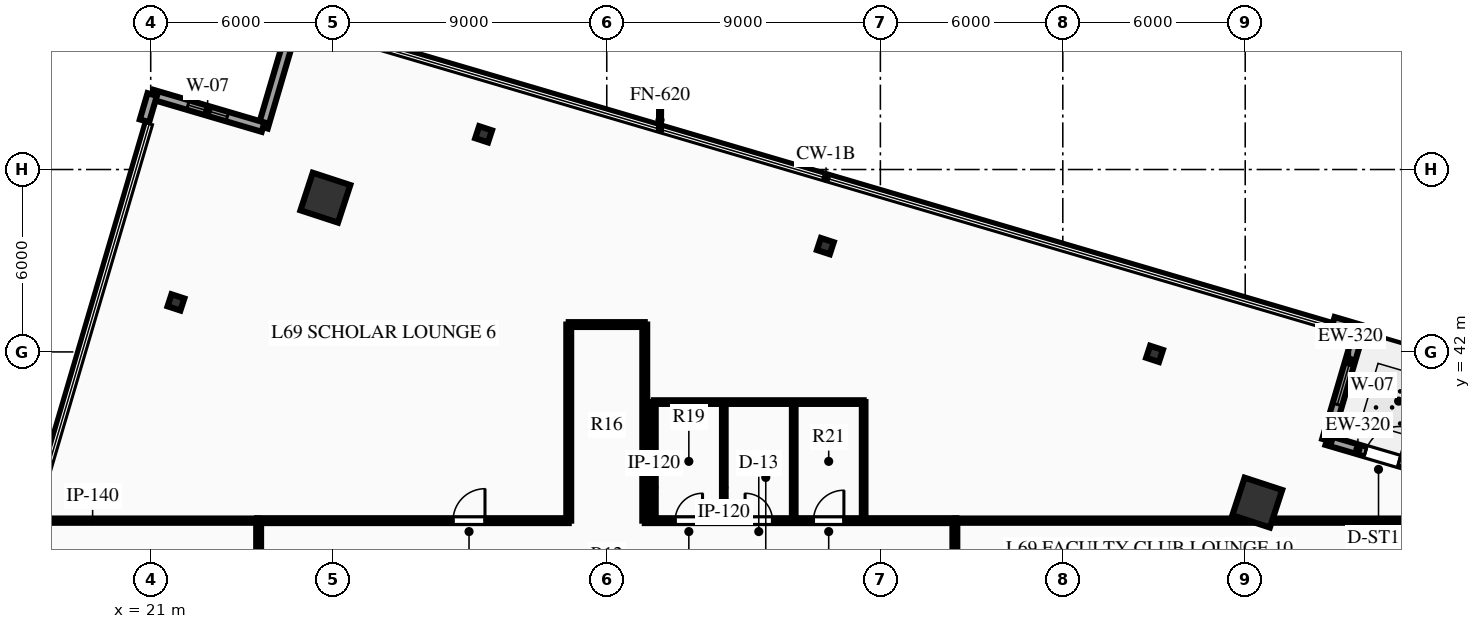
"""IFC4 building model, lengths in metres.
Left out: names, types, materials, properties, quantities, classifications, styles, units other than length and angle.
Written with IfcOpenShell. Run it as: python <this file> out.ifc"""

import sys

from ifc_helpers import new_model, si_unit, direction, frame, frame_2d, origin, origin_2d, place, context, subcontext, project, spatial, rectangle, hollow_rectangle, i_section, extrude, element, fill, save


model = new_model("IFC4")
c1 = context("Model", 3, precision=1e-05, world=origin(), true_north=direction((0.0, 1.0)))
c2 = subcontext(c1, "Body", "Model", "MODEL_VIEW")
j1 = project(units=[si_unit("LENGTHUNIT", "METRE"), si_unit("PLANEANGLEUNIT", "RADIAN")], contexts=[c1])
p1 = place(None, origin())
s1 = spatial("IfcSite", under=j1, at=p1, CompositionType="ELEMENT")
p2 = place(p1, origin())
s2 = spatial("IfcBuilding", under=s1, at=p2, CompositionType="ELEMENT")
p3 = place(p2, frame((0.0, 0.0, 274.95)))
s3 = spatial("IfcBuildingStorey", under=s2, at=p3, CompositionType="ELEMENT", Elevation=274.95)
for number, where, z_axis, x_axis in (
    (1, (57.396, 37.043, 0.0), (0.0, 0.0, 1.0), (0.311, 0.95, 0.0)),
    (2, (26.745, 47.073, 0.0), (0.0, 0.0, 1.0), (0.311, 0.95, 0.0)),
):
    element("IfcColumn", number, at=place(p3, frame(where, z_axis=z_axis, x_axis=x_axis)), inside=s3, PredefinedType="COLUMN", context=c2, shape_type="SweptSolid", body=[
        extrude(hollow_rectangle(XDim=1.3, YDim=1.3, WallThickness=0.06, at=origin_2d()), origin(), (0.0, 0.0, 1.0), 3.75),
    ])
for number, where, z_axis, x_axis in (
    (3, (54.018, 41.937, 0.0), (0.0, 0.0, 1.0), (0.311, 0.95, 0.0)),
    (4, (43.19, 45.48, 0.0), (0.0, 0.0, 1.0), (0.311, 0.95, 0.0)),
    (5, (31.949, 49.158, 0.0), (0.0, 0.0, 1.0), (0.311, 0.95, 0.0)),
    (6, (21.83, 43.629, 0.0), (0.0, 0.0, 1.0), (0.311, 0.95, 0.0)),
):
    element("IfcColumn", number, at=place(p3, frame(where, z_axis=z_axis, x_axis=x_axis)), inside=s3, PredefinedType="COLUMN", context=c2, shape_type="SweptSolid", body=[
        extrude(i_section(OverallWidth=0.416, OverallDepth=0.445, WebThickness=0.039, FlangeThickness=0.063, at=origin_2d()), origin(), (0.0, 0.0, 1.0), 3.75),
    ])
p4 = place(p3, frame((59.686, 39.095, 0.0), z_axis=(0.0, 0.0, 1.0), x_axis=(0.959321496859, -0.282315896939, 0.0)))
e7 = element("IfcWall", 7, at=p4, inside=s3, PredefinedType="STANDARD", context=c2, shape_type="SweptSolid", body=[
    extrude(rectangle(XDim=3.8, YDim=0.32, at=frame_2d((1.9, 0.0))), origin(), (0.0, 0.0, 1.0), 3.48),
])
p5 = place(p4, frame((1.325, 0.0, 0.0)))
e8 = element("IfcOpeningElement", 8, at=p5, cuts=e7, PredefinedType="OPENING", context=c2, shape_type="SweptSolid", body=[
    extrude(rectangle(XDim=1.15, YDim=2.2, at=frame_2d((0.575, 1.1))), frame((0.0, 0.17, 0.0), z_axis=(0.0, -1.0, 0.0), x_axis=(1.0, 0.0, 0.0)), (0.0, 0.0, 1.0), 0.34),
])
p6 = place(p3, frame((60.759, 42.74, 0.0), z_axis=(0.0, 0.0, 1.0), x_axis=(-0.282315896939, -0.959321496859, 0.0)))
e9 = element("IfcWall", 9, at=p6, inside=s3, PredefinedType="STANDARD", context=c2, shape_type="SweptSolid", body=[
    extrude(rectangle(XDim=3.8, YDim=0.32, at=frame_2d((1.9, 0.0))), origin(), (0.0, 0.0, 1.0), 3.48),
])
p7 = place(p6, frame((1.225, 0.0, 0.85)))
e10 = element("IfcOpeningElement", 10, at=p7, cuts=e9, PredefinedType="OPENING", context=c2, shape_type="SweptSolid", body=[
    extrude(rectangle(XDim=1.35, YDim=1.95, at=frame_2d((0.675, 0.975))), frame((0.0, 0.17, 0.0), z_axis=(0.0, -1.0, 0.0), x_axis=(1.0, 0.0, 0.0)), (0.0, 0.0, 1.0), 0.34),
])
p8 = place(p3, frame((59.896, 42.995, 0.0), z_axis=(0.0, 0.0, 1.0), x_axis=(0.959292029891, -0.282416007669, 0.0)))
e11 = element("IfcWall", 11, at=p8, inside=s3, PredefinedType="STANDARD", context=c2, shape_type="SweptSolid", body=[
    extrude(rectangle(XDim=0.9, YDim=0.32, at=frame_2d((0.45, 0.0))), origin(), (0.0, 0.0, 1.0), 3.48),
])
p9 = place(p3, frame((24.695, 49.394, 0.0), z_axis=(0.0, 0.0, 1.0), x_axis=(0.282315896939, 0.959321496859, 0.0)))
e12 = element("IfcWall", 12, at=p9, inside=s3, PredefinedType="STANDARD", context=c2, shape_type="SweptSolid", body=[
    extrude(rectangle(XDim=3.8, YDim=0.32, at=frame_2d((1.9, 0.0))), origin(), (0.0, 0.0, 1.0), 3.48),
])
p10 = place(p3, frame((21.05, 50.467, 0.0), z_axis=(0.0, 0.0, 1.0), x_axis=(0.959321496859, -0.282315896939, 0.0)))
e13 = element("IfcWall", 13, at=p10, inside=s3, PredefinedType="STANDARD", context=c2, shape_type="SweptSolid", body=[
    extrude(rectangle(XDim=3.8, YDim=0.32, at=frame_2d((1.9, 0.0))), origin(), (0.0, 0.0, 1.0), 3.48),
])
p11 = place(p10, frame((1.225, 0.0, 0.85)))
e14 = element("IfcOpeningElement", 14, at=p11, cuts=e13, PredefinedType="OPENING", context=c2, shape_type="SweptSolid", body=[
    extrude(rectangle(XDim=1.35, YDim=1.95, at=frame_2d((0.675, 0.975))), frame((0.0, 0.17, 0.0), z_axis=(0.0, -1.0, 0.0), x_axis=(1.0, 0.0, 0.0)), (0.0, 0.0, 1.0), 0.34),
])
p12 = place(p3, frame((20.796, 49.603, 0.0), z_axis=(0.0, 0.0, 1.0), x_axis=(0.282342527421, 0.959313659451, 0.0)))
e15 = element("IfcWall", 15, at=p12, inside=s3, PredefinedType="STANDARD", context=c2, shape_type="SweptSolid", body=[
    extrude(rectangle(XDim=0.9, YDim=0.32, at=frame_2d((0.45, 0.0))), origin(), (0.0, 0.0, 1.0), 3.48),
])
p13 = place(p3, frame((24.5, 36.45, 0.0), z_axis=(0.0, 0.0, 1.0), x_axis=(1.0, 0.0, 0.0)))
e16 = element("IfcWall", 16, at=p13, inside=s3, PredefinedType="PARTITIONING", context=c2, shape_type="SweptSolid", body=[
    extrude(rectangle(XDim=10.25, YDim=0.16, at=frame_2d((5.125, 0.0))), origin(), (0.0, 0.0, 1.0), 3.48),
])
p14 = place(p13, frame((6.445, 0.0, 0.0)))
e17 = element("IfcOpeningElement", 17, at=p14, cuts=e16, PredefinedType="OPENING", context=c2, shape_type="SweptSolid", body=[
    extrude(rectangle(XDim=1.05, YDim=2.15, at=frame_2d((0.525, 1.075))), frame((0.0, 0.09, 0.0), z_axis=(0.0, -1.0, 0.0), x_axis=(1.0, 0.0, 0.0)), (0.0, 0.0, 1.0), 0.18),
])
p15 = place(p3, frame((37.25, 36.45, 0.0), z_axis=(0.0, 0.0, 1.0), x_axis=(1.0, 0.0, 0.0)))
e18 = element("IfcWall", 18, at=p15, inside=s3, PredefinedType="PARTITIONING", context=c2, shape_type="SweptSolid", body=[
    extrude(rectangle(XDim=10.25, YDim=0.16, at=frame_2d((5.125, 0.0))), origin(), (0.0, 0.0, 1.0), 3.48),
])
p16 = place(p15, frame((1.0, 0.0, 0.0)))
e19 = element("IfcOpeningElement", 19, at=p16, cuts=e18, PredefinedType="OPENING", context=c2, shape_type="SweptSolid", body=[
    extrude(rectangle(XDim=0.9, YDim=2.15, at=frame_2d((0.45, 1.075))), frame((0.0, 0.09, 0.0), z_axis=(0.0, -1.0, 0.0), x_axis=(1.0, 0.0, 0.0)), (0.0, 0.0, 1.0), 0.18),
])
p17 = place(p15, frame((3.3, 0.0, 0.0)))
e20 = element("IfcOpeningElement", 20, at=p17, cuts=e18, PredefinedType="OPENING", context=c2, shape_type="SweptSolid", body=[
    extrude(rectangle(XDim=0.9, YDim=2.15, at=frame_2d((0.45, 1.075))), frame((0.0, 0.09, 0.0), z_axis=(0.0, -1.0, 0.0), x_axis=(1.0, 0.0, 0.0)), (0.0, 0.0, 1.0), 0.18),
])
p18 = place(p15, frame((5.55, 0.0, 0.0)))
e21 = element("IfcOpeningElement", 21, at=p18, cuts=e18, PredefinedType="OPENING", context=c2, shape_type="SweptSolid", body=[
    extrude(rectangle(XDim=1.0, YDim=2.15, at=frame_2d((0.5, 1.075))), frame((0.0, 0.09, 0.0), z_axis=(0.0, -1.0, 0.0), x_axis=(1.0, 0.0, 0.0)), (0.0, 0.0, 1.0), 0.18),
])
p19 = place(p3, frame((24.55, 27.25, 0.0), z_axis=(0.0, 0.0, 1.0), x_axis=(0.0, 1.0, 0.0)))
e22 = element("IfcWall", 22, at=p19, inside=s3, PredefinedType="PARTITIONING", context=c2, shape_type="SweptSolid", body=[
    extrude(rectangle(XDim=9.2, YDim=0.16, at=frame_2d((4.6, 0.0))), origin(), (0.0, 0.0, 1.0), 3.48),
])
p20 = place(p19, frame((2.419, 0.0, 0.0)))
e23 = element("IfcOpeningElement", 23, at=p20, cuts=e22, PredefinedType="OPENING", context=c2, shape_type="SweptSolid", body=[
    extrude(rectangle(XDim=1.05, YDim=2.15, at=frame_2d((0.525, 1.075))), frame((0.0, 0.09, 0.0), z_axis=(0.0, -1.0, 0.0), x_axis=(1.0, 0.0, 0.0)), (0.0, 0.0, 1.0), 0.18),
])
p21 = place(p3, frame((47.45, 27.25, 0.0), z_axis=(0.0, 0.0, 1.0), x_axis=(0.0, 1.0, 0.0)))
e24 = element("IfcWall", 24, at=p21, inside=s3, PredefinedType="PARTITIONING", context=c2, shape_type="SweptSolid", body=[
    extrude(rectangle(XDim=9.2, YDim=0.16, at=frame_2d((4.6, 0.0))), origin(), (0.0, 0.0, 1.0), 3.48),
])
p22 = place(p21, frame((5.083, 0.0, 0.0)))
e25 = element("IfcOpeningElement", 25, at=p22, cuts=e24, PredefinedType="OPENING", context=c2, shape_type="SweptSolid", body=[
    extrude(rectangle(XDim=1.05, YDim=2.15, at=frame_2d((0.525, 1.075))), frame((0.0, 0.09, 0.0), z_axis=(0.0, -1.0, 0.0), x_axis=(1.0, 0.0, 0.0)), (0.0, 0.0, 1.0), 0.18),
])
for number, where, z_axis, x_axis in (
    (26, (34.75, 36.45, 0.0), (0.0, 0.0, 1.0), (0.0, 1.0, 0.0)),
    (27, (37.25, 36.45, 0.0), (0.0, 0.0, 1.0), (0.0, 1.0, 0.0)),
):
    element("IfcWall", number, at=place(p3, frame(where, z_axis=z_axis, x_axis=x_axis)), inside=s3, PredefinedType="PARTITIONING", context=c2, shape_type="SweptSolid", body=[
        extrude(rectangle(XDim=6.45, YDim=0.16, at=frame_2d((3.225, 0.0))), origin(), (0.0, 0.0, 1.0), 3.48),
    ])
p23 = place(p3, frame((34.75, 42.9, 0.0), z_axis=(0.0, 0.0, 1.0), x_axis=(1.0, 0.0, 0.0)))
e28 = element("IfcWall", 28, at=p23, inside=s3, PredefinedType="PARTITIONING", context=c2, shape_type="SweptSolid", body=[
    extrude(rectangle(XDim=2.5, YDim=0.16, at=frame_2d((1.25, 0.0))), origin(), (0.0, 0.0, 1.0), 3.48),
])
for number, where, z_axis, x_axis in (
    (29, (37.55, 36.45, 0.0), (0.0, 0.0, 1.0), (0.0, 1.0, 0.0)),
    (30, (39.85, 36.45, 0.0), (0.0, 0.0, 1.0), (0.0, 1.0, 0.0)),
    (31, (42.15, 36.45, 0.0), (0.0, 0.0, 1.0), (0.0, 1.0, 0.0)),
    (32, (44.45, 36.45, 0.0), (0.0, 0.0, 1.0), (0.0, 1.0, 0.0)),
):
    element("IfcWall", number, at=place(p3, frame(where, z_axis=z_axis, x_axis=x_axis)), inside=s3, PredefinedType="PARTITIONING", context=c2, shape_type="SweptSolid", body=[
        extrude(rectangle(XDim=3.9, YDim=0.12, at=frame_2d((1.95, 0.0))), origin(), (0.0, 0.0, 1.0), 3.48),
    ])
p24 = place(p3, frame((37.55, 40.35, 0.0), z_axis=(0.0, 0.0, 1.0), x_axis=(1.0, 0.0, 0.0)))
e33 = element("IfcWall", 33, at=p24, inside=s3, PredefinedType="PARTITIONING", context=c2, shape_type="SweptSolid", body=[
    extrude(rectangle(XDim=6.9, YDim=0.12, at=frame_2d((3.45, 0.0))), origin(), (0.0, 0.0, 1.0), 3.48),
])
p25 = place(p3, frame((16.966, 36.45, 0.0), z_axis=(0.0, 0.0, 1.0), x_axis=(1.0, 0.0, 0.0)))
e34 = element("IfcWall", 34, at=p25, inside=s3, PredefinedType="PARTITIONING", context=c2, shape_type="SweptSolid", body=[
    extrude(rectangle(XDim=7.584, YDim=0.14, at=frame_2d((3.792, 0.0))), origin(), (0.0, 0.0, 1.0), 3.48),
])
p26 = place(p3, frame((47.45, 36.45, 0.0), z_axis=(0.0, 0.0, 1.0), x_axis=(1.0, 0.0, 0.0)))
e35 = element("IfcWall", 35, at=p26, inside=s3, PredefinedType="PARTITIONING", context=c2, shape_type="SweptSolid", body=[
    extrude(rectangle(XDim=15.377, YDim=0.14, at=frame_2d((7.688, 0.0))), origin(), (0.0, 0.0, 1.0), 2.858),
])
p27 = place(p5, origin())
e36 = element("IfcDoor", 36, at=p27, inside=s3, OperationType="SINGLE_SWING_RIGHT", PredefinedType="DOOR", context=c2, shape_type="SweptSolid", body=[
    extrude(rectangle(XDim=1.15, YDim=2.2, at=frame_2d((0.575, 1.1))), frame((0.0, 0.025, 0.0), z_axis=(0.0, -1.0, 0.0), x_axis=(1.0, 0.0, 0.0)), (0.0, 0.0, 1.0), 0.05),
])
fill(e8, e36)
p28 = place(p7, origin())
e37 = element("IfcWindow", 37, at=p28, inside=s3, PartitioningType="SINGLE_PANEL", PredefinedType="WINDOW", context=c2, shape_type="SweptSolid", body=[
    extrude(rectangle(XDim=1.35, YDim=1.95, at=frame_2d((0.675, 0.975))), frame((0.0, 0.03, 0.0), z_axis=(0.0, -1.0, 0.0), x_axis=(1.0, 0.0, 0.0)), (0.0, 0.0, 1.0), 0.06),
])
fill(e10, e37)
p29 = place(p11, origin())
e38 = element("IfcWindow", 38, at=p29, inside=s3, PartitioningType="SINGLE_PANEL", PredefinedType="WINDOW", context=c2, shape_type="SweptSolid", body=[
    extrude(rectangle(XDim=1.35, YDim=1.95, at=frame_2d((0.675, 0.975))), frame((0.0, 0.03, 0.0), z_axis=(0.0, -1.0, 0.0), x_axis=(1.0, 0.0, 0.0)), (0.0, 0.0, 1.0), 0.06),
])
fill(e14, e38)
p30 = place(p16, origin())
e39 = element("IfcDoor", 39, at=p30, inside=s3, OperationType="SINGLE_SWING_RIGHT", PredefinedType="DOOR", context=c2, shape_type="SweptSolid", body=[
    extrude(rectangle(XDim=0.9, YDim=2.15, at=frame_2d((0.45, 1.075))), frame((0.0, 0.025, 0.0), z_axis=(0.0, -1.0, 0.0), x_axis=(1.0, 0.0, 0.0)), (0.0, 0.0, 1.0), 0.05),
])
fill(e19, e39)
p31 = place(p17, origin())
e40 = element("IfcDoor", 40, at=p31, inside=s3, OperationType="SINGLE_SWING_LEFT", PredefinedType="DOOR", context=c2, shape_type="SweptSolid", body=[
    extrude(rectangle(XDim=0.9, YDim=2.15, at=frame_2d((0.45, 1.075))), frame((0.0, 0.025, 0.0), z_axis=(0.0, -1.0, 0.0), x_axis=(1.0, 0.0, 0.0)), (0.0, 0.0, 1.0), 0.05),
])
fill(e20, e40)
p32 = place(p18, origin())
e41 = element("IfcDoor", 41, at=p32, inside=s3, OperationType="SINGLE_SWING_RIGHT", PredefinedType="DOOR", context=c2, shape_type="SweptSolid", body=[
    extrude(rectangle(XDim=1.0, YDim=2.15, at=frame_2d((0.5, 1.075))), frame((0.0, 0.025, 0.0), z_axis=(0.0, -1.0, 0.0), x_axis=(1.0, 0.0, 0.0)), (0.0, 0.0, 1.0), 0.05),
])
fill(e21, e41)
p33 = place(p14, origin())
e42 = element("IfcDoor", 42, at=p33, inside=s3, OperationType="SINGLE_SWING_RIGHT", PredefinedType="DOOR", context=c2, shape_type="SweptSolid", body=[
    extrude(rectangle(XDim=1.05, YDim=2.15, at=frame_2d((0.525, 1.075))), frame((0.0, 0.025, 0.0), z_axis=(0.0, -1.0, 0.0), x_axis=(1.0, 0.0, 0.0)), (0.0, 0.0, 1.0), 0.05),
])
fill(e17, e42)
save(model, sys.argv[1])
